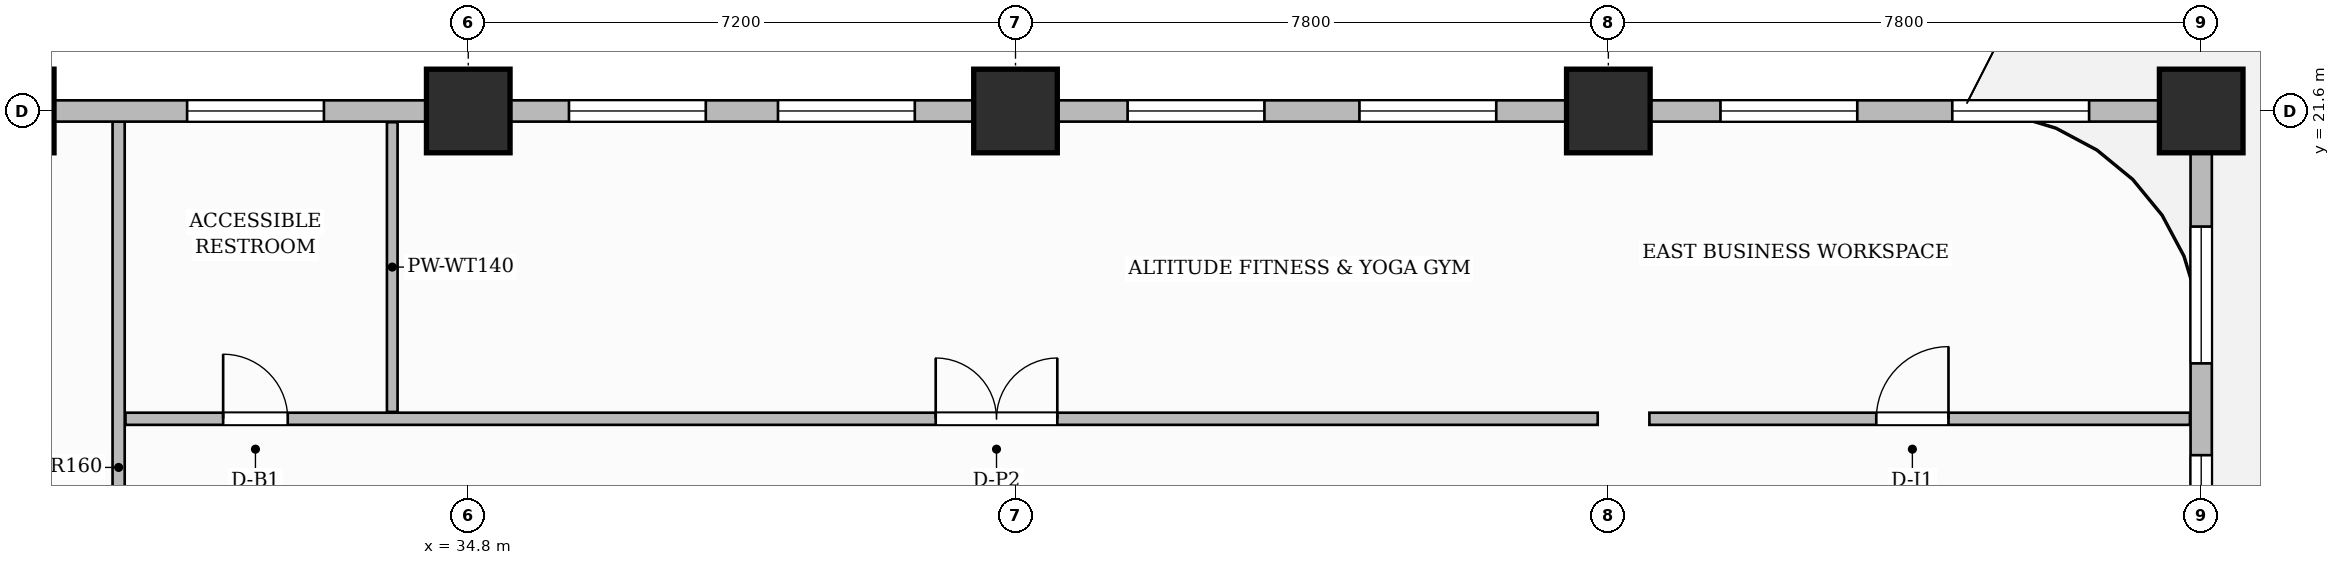
"""IFC4 building model, lengths in metres.
Left out: names, types, materials, properties, quantities, classifications, styles, units other than length and angle.
Written with IfcOpenShell. Run it as: python <this file> out.ifc"""

import sys

from ifc_helpers import new_model, si_unit, direction, frame, frame_2d, origin, origin_2d, place, context, subcontext, project, spatial, rectangle, extrude, source, transform, mapped, element, fill, save


model = new_model("IFC4")
c1 = context("Model", 3, precision=1e-05, world=origin(), true_north=direction((0.0, 1.0)))
c2 = subcontext(c1, "Body", "Model", "MODEL_VIEW")
j1 = project(units=[si_unit("LENGTHUNIT", "METRE"), si_unit("PLANEANGLEUNIT", "RADIAN")], contexts=[c1])
p1 = place(None, origin())
s1 = spatial("IfcSite", under=j1, at=p1, CompositionType="ELEMENT")
p2 = place(p1, origin())
s2 = spatial("IfcBuilding", under=s1, at=p2, CompositionType="ELEMENT")
p3 = place(p2, frame((0.0, 0.0, 50.9)))
s3 = spatial("IfcBuildingStorey", under=s2, at=p3, CompositionType="ELEMENT", Elevation=50.9)
m1 = source(origin(), c2, "Body", "SweptSolid", [
    extrude(rectangle(XDim=1.1, YDim=1.1, at=origin_2d()), origin(), (0.0, 0.0, 1.0), 3.7),
])
for number, where, z_axis, x_axis in (
    (1, (28.8, 21.6, 0.0), (0.0, 0.0, 1.0), (1.0, 0.0, 0.0)),
    (2, (34.8, 21.6, 0.0), (0.0, 0.0, 1.0), (1.0, 0.0, 0.0)),
    (3, (42.0, 21.6, 0.0), (0.0, 0.0, 1.0), (1.0, 0.0, 0.0)),
    (4, (49.8, 21.6, 0.0), (0.0, 0.0, 1.0), (1.0, 0.0, 0.0)),
    (5, (57.6, 21.6, 0.0), (0.0, 0.0, 1.0), (1.0, 0.0, 0.0)),
):
    element("IfcColumn", number, at=place(p3, frame(where, z_axis=z_axis, x_axis=x_axis)), inside=s3, PredefinedType="COLUMN", context=c2, shape_type="MappedRepresentation", body=[
        mapped(m1, transform((0.0, 0.0, 0.0), scale=1.0)),
    ])
p4 = place(p3, frame((30.2, 12.36, 0.0), z_axis=(0.0, 0.0, 1.0), x_axis=(0.0, 1.0, 0.0)))
e6 = element("IfcWall", 6, at=p4, inside=s3, PredefinedType="PARTITIONING", context=c2, shape_type="SweptSolid", body=[
    extrude(rectangle(XDim=9.1, YDim=0.16, at=frame_2d((4.55, 0.0))), origin(), (0.0, 0.0, 1.0), 3.45),
])
p5 = place(p3, frame((30.29, 17.55, 0.0), z_axis=(0.0, 0.0, 1.0), x_axis=(1.0, 0.0, 0.0)))
e7 = element("IfcWall", 7, at=p5, inside=s3, PredefinedType="PARTITIONING", context=c2, shape_type="SweptSolid", body=[
    extrude(rectangle(XDim=19.37, YDim=0.16, at=frame_2d((9.685, 0.0))), origin(), (0.0, 0.0, 1.0), 3.45),
])
p6 = place(p5, frame((1.285, 0.0, 0.0)))
e8 = element("IfcOpeningElement", 8, at=p6, cuts=e7, PredefinedType="OPENING", context=c2, shape_type="SweptSolid", body=[
    extrude(rectangle(XDim=0.85, YDim=2.1, at=frame_2d((0.425, 1.05))), frame((0.0, 0.09, 0.0), z_axis=(0.0, -1.0, 0.0), x_axis=(1.0, 0.0, 0.0)), (0.0, 0.0, 1.0), 0.18),
])
p7 = place(p5, frame((10.66, 0.0, 0.0)))
e9 = element("IfcOpeningElement", 9, at=p7, cuts=e7, PredefinedType="OPENING", context=c2, shape_type="SweptSolid", body=[
    extrude(rectangle(XDim=1.6, YDim=2.4, at=frame_2d((0.8, 1.2))), frame((0.0, 0.09, 0.0), z_axis=(0.0, -1.0, 0.0), x_axis=(1.0, 0.0, 0.0)), (0.0, 0.0, 1.0), 0.18),
])
p8 = place(p3, frame((50.34, 17.55, 0.0), z_axis=(0.0, 0.0, 1.0), x_axis=(1.0, 0.0, 0.0)))
e10 = element("IfcWall", 10, at=p8, inside=s3, PredefinedType="PARTITIONING", context=c2, shape_type="SweptSolid", body=[
    extrude(rectangle(XDim=7.112, YDim=0.16, at=frame_2d((3.556, 0.0))), origin(), (0.0, 0.0, 1.0), 3.45),
])
p9 = place(p8, frame((2.985, 0.0, 0.0)))
e11 = element("IfcOpeningElement", 11, at=p9, cuts=e10, PredefinedType="OPENING", context=c2, shape_type="SweptSolid", body=[
    extrude(rectangle(XDim=0.95, YDim=2.15, at=frame_2d((0.475, 1.075))), frame((0.0, 0.09, 0.0), z_axis=(0.0, -1.0, 0.0), x_axis=(1.0, 0.0, 0.0)), (0.0, 0.0, 1.0), 0.18),
])
p10 = place(p3, frame((33.8, 17.64, 0.0), z_axis=(0.0, 0.0, 1.0), x_axis=(0.0, 1.0, 0.0)))
e12 = element("IfcWall", 12, at=p10, inside=s3, PredefinedType="PARTITIONING", context=c2, shape_type="SweptSolid", body=[
    extrude(rectangle(XDim=3.812, YDim=0.14, at=frame_2d((1.906, 0.0))), origin(), (0.0, 0.0, 1.0), 3.45),
])
p11 = place(p3, frame((57.6, 0.05, 0.0), z_axis=(0.0, 0.0, 1.0), x_axis=(0.0, 1.0, 0.0)))
e13 = element("IfcWall", 13, at=p11, inside=s3, PredefinedType="SOLIDWALL", context=c2, shape_type="SweptSolid", body=[
    extrude(rectangle(XDim=21.5, YDim=0.28, at=frame_2d((10.75, 0.0))), origin(), (0.0, 0.0, 1.0), 2.885),
])
p12 = place(p11, frame((2.75, 0.0, 0.0)))
e14 = element("IfcOpeningElement", 14, at=p12, cuts=e13, PredefinedType="OPENING", context=c2, shape_type="SweptSolid", body=[
    extrude(rectangle(XDim=1.2, YDim=2.2, at=frame_2d((0.6, 1.1))), frame((0.0, 0.15, 0.0), z_axis=(0.0, -1.0, 0.0), x_axis=(1.0, 0.0, 0.0)), (0.0, 0.0, 1.0), 0.3),
])
p13 = place(p11, frame((1.025, 0.0, 0.8)))
e15 = element("IfcOpeningElement", 15, at=p13, cuts=e13, PredefinedType="OPENING", context=c2, shape_type="SweptSolid", body=[
    extrude(rectangle(XDim=1.15, YDim=1.8, at=frame_2d((0.575, 0.9))), frame((0.0, 0.15, 0.0), z_axis=(0.0, -1.0, 0.0), x_axis=(1.0, 0.0, 0.0)), (0.0, 0.0, 1.0), 0.3),
])
p14 = place(p11, frame((4.654, 0.0, 0.8)))
e16 = element("IfcOpeningElement", 16, at=p14, cuts=e13, PredefinedType="OPENING", context=c2, shape_type="SweptSolid", body=[
    extrude(rectangle(XDim=1.4, YDim=1.85, at=frame_2d((0.7, 0.925))), frame((0.0, 0.15, 0.0), z_axis=(0.0, -1.0, 0.0), x_axis=(1.0, 0.0, 0.0)), (0.0, 0.0, 1.0), 0.3),
])
p15 = place(p11, frame((10.454, 0.0, 0.8)))
e17 = element("IfcOpeningElement", 17, at=p15, cuts=e13, PredefinedType="OPENING", context=c2, shape_type="SweptSolid", body=[
    extrude(rectangle(XDim=1.8, YDim=1.85, at=frame_2d((0.9, 0.925))), frame((0.0, 0.15, 0.0), z_axis=(0.0, -1.0, 0.0), x_axis=(1.0, 0.0, 0.0)), (0.0, 0.0, 1.0), 0.3),
])
p16 = place(p11, frame((15.621, 0.0, 0.8)))
e18 = element("IfcOpeningElement", 18, at=p16, cuts=e13, PredefinedType="OPENING", context=c2, shape_type="SweptSolid", body=[
    extrude(rectangle(XDim=1.4, YDim=1.85, at=frame_2d((0.7, 0.925))), frame((0.0, 0.15, 0.0), z_axis=(0.0, -1.0, 0.0), x_axis=(1.0, 0.0, 0.0)), (0.0, 0.0, 1.0), 0.3),
])
p17 = place(p11, frame((18.229, 0.0, 0.8)))
e19 = element("IfcOpeningElement", 19, at=p17, cuts=e13, PredefinedType="OPENING", context=c2, shape_type="SweptSolid", body=[
    extrude(rectangle(XDim=1.8, YDim=1.85, at=frame_2d((0.9, 0.925))), frame((0.0, 0.15, 0.0), z_axis=(0.0, -1.0, 0.0), x_axis=(1.0, 0.0, 0.0)), (0.0, 0.0, 1.0), 0.3),
])
p18 = place(p3, frame((14.4, 21.6, 0.0), z_axis=(0.0, 0.0, 1.0), x_axis=(1.0, 0.0, 0.0)))
e20 = element("IfcWall", 20, at=p18, inside=s3, PredefinedType="SOLIDWALL", context=c2, shape_type="SweptSolid", body=[
    extrude(rectangle(XDim=43.2, YDim=0.28, at=frame_2d((21.6, 0.0))), origin(), (0.0, 0.0, 1.0), 2.885),
])
p19 = place(p18, frame((1.5, 0.0, 0.0)))
e21 = element("IfcOpeningElement", 21, at=p19, cuts=e20, PredefinedType="OPENING", context=c2, shape_type="SweptSolid", body=[
    extrude(rectangle(XDim=1.2, YDim=2.2, at=frame_2d((0.6, 1.1))), frame((0.0, 0.15, 0.0), z_axis=(0.0, -1.0, 0.0), x_axis=(1.0, 0.0, 0.0)), (0.0, 0.0, 1.0), 0.3),
])
p20 = place(p18, frame((3.321, 0.0, 0.8)))
e22 = element("IfcOpeningElement", 22, at=p20, cuts=e20, PredefinedType="OPENING", context=c2, shape_type="SweptSolid", body=[
    extrude(rectangle(XDim=1.15, YDim=1.8, at=frame_2d((0.575, 0.9))), frame((0.0, 0.15, 0.0), z_axis=(0.0, -1.0, 0.0), x_axis=(1.0, 0.0, 0.0)), (0.0, 0.0, 1.0), 0.3),
])
p21 = place(p18, frame((5.129, 0.0, 0.8)))
e23 = element("IfcOpeningElement", 23, at=p21, cuts=e20, PredefinedType="OPENING", context=c2, shape_type="SweptSolid", body=[
    extrude(rectangle(XDim=0.95, YDim=1.75, at=frame_2d((0.475, 0.875))), frame((0.0, 0.15, 0.0), z_axis=(0.0, -1.0, 0.0), x_axis=(1.0, 0.0, 0.0)), (0.0, 0.0, 1.0), 0.3),
])
p22 = place(p18, frame((8.496, 0.0, 0.8)))
e24 = element("IfcOpeningElement", 24, at=p22, cuts=e20, PredefinedType="OPENING", context=c2, shape_type="SweptSolid", body=[
    extrude(rectangle(XDim=1.4, YDim=1.85, at=frame_2d((0.7, 0.925))), frame((0.0, 0.15, 0.0), z_axis=(0.0, -1.0, 0.0), x_axis=(1.0, 0.0, 0.0)), (0.0, 0.0, 1.0), 0.3),
])
p23 = place(p18, frame((11.104, 0.0, 0.8)))
e25 = element("IfcOpeningElement", 25, at=p23, cuts=e20, PredefinedType="OPENING", context=c2, shape_type="SweptSolid", body=[
    extrude(rectangle(XDim=1.8, YDim=1.85, at=frame_2d((0.9, 0.925))), frame((0.0, 0.15, 0.0), z_axis=(0.0, -1.0, 0.0), x_axis=(1.0, 0.0, 0.0)), (0.0, 0.0, 1.0), 0.3),
])
p24 = place(p18, frame((16.701, 0.0, 0.8)))
e26 = element("IfcOpeningElement", 26, at=p24, cuts=e20, PredefinedType="OPENING", context=c2, shape_type="SweptSolid", body=[
    extrude(rectangle(XDim=1.8, YDim=1.85, at=frame_2d((0.9, 0.925))), frame((0.0, 0.15, 0.0), z_axis=(0.0, -1.0, 0.0), x_axis=(1.0, 0.0, 0.0)), (0.0, 0.0, 1.0), 0.3),
])
p25 = place(p18, frame((21.725, 0.0, 0.8)))
e27 = element("IfcOpeningElement", 27, at=p25, cuts=e20, PredefinedType="OPENING", context=c2, shape_type="SweptSolid", body=[
    extrude(rectangle(XDim=1.8, YDim=1.85, at=frame_2d((0.9, 0.925))), frame((0.0, 0.15, 0.0), z_axis=(0.0, -1.0, 0.0), x_axis=(1.0, 0.0, 0.0)), (0.0, 0.0, 1.0), 0.3),
])
p26 = place(p18, frame((24.475, 0.0, 0.8)))
e28 = element("IfcOpeningElement", 28, at=p26, cuts=e20, PredefinedType="OPENING", context=c2, shape_type="SweptSolid", body=[
    extrude(rectangle(XDim=1.8, YDim=1.85, at=frame_2d((0.9, 0.925))), frame((0.0, 0.15, 0.0), z_axis=(0.0, -1.0, 0.0), x_axis=(1.0, 0.0, 0.0)), (0.0, 0.0, 1.0), 0.3),
])
p27 = place(p18, frame((29.075, 0.0, 0.8)))
e29 = element("IfcOpeningElement", 29, at=p27, cuts=e20, PredefinedType="OPENING", context=c2, shape_type="SweptSolid", body=[
    extrude(rectangle(XDim=1.8, YDim=1.85, at=frame_2d((0.9, 0.925))), frame((0.0, 0.15, 0.0), z_axis=(0.0, -1.0, 0.0), x_axis=(1.0, 0.0, 0.0)), (0.0, 0.0, 1.0), 0.3),
])
p28 = place(p18, frame((32.125, 0.0, 0.8)))
e30 = element("IfcOpeningElement", 30, at=p28, cuts=e20, PredefinedType="OPENING", context=c2, shape_type="SweptSolid", body=[
    extrude(rectangle(XDim=1.8, YDim=1.85, at=frame_2d((0.9, 0.925))), frame((0.0, 0.15, 0.0), z_axis=(0.0, -1.0, 0.0), x_axis=(1.0, 0.0, 0.0)), (0.0, 0.0, 1.0), 0.3),
])
p29 = place(p18, frame((36.875, 0.0, 0.8)))
e31 = element("IfcOpeningElement", 31, at=p29, cuts=e20, PredefinedType="OPENING", context=c2, shape_type="SweptSolid", body=[
    extrude(rectangle(XDim=1.8, YDim=1.85, at=frame_2d((0.9, 0.925))), frame((0.0, 0.15, 0.0), z_axis=(0.0, -1.0, 0.0), x_axis=(1.0, 0.0, 0.0)), (0.0, 0.0, 1.0), 0.3),
])
p30 = place(p18, frame((39.925, 0.0, 0.8)))
e32 = element("IfcOpeningElement", 32, at=p30, cuts=e20, PredefinedType="OPENING", context=c2, shape_type="SweptSolid", body=[
    extrude(rectangle(XDim=1.8, YDim=1.85, at=frame_2d((0.9, 0.925))), frame((0.0, 0.15, 0.0), z_axis=(0.0, -1.0, 0.0), x_axis=(1.0, 0.0, 0.0)), (0.0, 0.0, 1.0), 0.3),
])
m2 = source(origin(), c2, "Body", "SweptSolid", [
    extrude(rectangle(XDim=0.95, YDim=2.15, at=frame_2d((0.475, 1.075))), frame((0.0, 0.025, 0.0), z_axis=(0.0, -1.0, 0.0), x_axis=(1.0, 0.0, 0.0)), (0.0, 0.0, 1.0), 0.05),
])
p31 = place(p9, origin())
e33 = element("IfcDoor", 33, at=p31, inside=s3, OperationType="SINGLE_SWING_RIGHT", PredefinedType="DOOR", context=c2, shape_type="MappedRepresentation", body=[
    mapped(m2, transform((0.0, 0.0, 0.0), scale=1.0)),
])
fill(e11, e33)
m3 = source(origin(), c2, "Body", "SweptSolid", [
    extrude(rectangle(XDim=0.85, YDim=2.1, at=frame_2d((0.425, 1.05))), frame((0.0, 0.025, 0.0), z_axis=(0.0, -1.0, 0.0), x_axis=(1.0, 0.0, 0.0)), (0.0, 0.0, 1.0), 0.05),
])
p32 = place(p6, origin())
e34 = element("IfcDoor", 34, at=p32, inside=s3, OperationType="SINGLE_SWING_LEFT", PredefinedType="DOOR", context=c2, shape_type="MappedRepresentation", body=[
    mapped(m3, transform((0.0, 0.0, 0.0), scale=1.0)),
])
fill(e8, e34)
m4 = source(origin(), c2, "Body", "SweptSolid", [
    extrude(rectangle(XDim=1.6, YDim=2.4, at=frame_2d((0.8, 1.2))), frame((0.0, 0.025, 0.0), z_axis=(0.0, -1.0, 0.0), x_axis=(1.0, 0.0, 0.0)), (0.0, 0.0, 1.0), 0.05),
])
p33 = place(p7, origin())
e35 = element("IfcDoor", 35, at=p33, inside=s3, OperationType="DOUBLE_DOOR_SINGLE_SWING", PredefinedType="DOOR", context=c2, shape_type="MappedRepresentation", body=[
    mapped(m4, transform((0.0, 0.0, 0.0), scale=1.0)),
])
fill(e9, e35)
m5 = source(origin(), c2, "Body", "SweptSolid", [
    extrude(rectangle(XDim=1.4, YDim=1.85, at=frame_2d((0.7, 0.925))), frame((0.0, 0.03, 0.0), z_axis=(0.0, -1.0, 0.0), x_axis=(1.0, 0.0, 0.0)), (0.0, 0.0, 1.0), 0.06),
])
p34 = place(p16, origin())
e36 = element("IfcWindow", 36, at=p34, inside=s3, PartitioningType="SINGLE_PANEL", PredefinedType="WINDOW", context=c2, shape_type="MappedRepresentation", body=[
    mapped(m5, transform((0.0, 0.0, 0.0), scale=1.0)),
])
fill(e18, e36)
m6 = source(origin(), c2, "Body", "SweptSolid", [
    extrude(rectangle(XDim=1.8, YDim=1.85, at=frame_2d((0.9, 0.925))), frame((0.0, 0.03, 0.0), z_axis=(0.0, -1.0, 0.0), x_axis=(1.0, 0.0, 0.0)), (0.0, 0.0, 1.0), 0.06),
])
p35 = place(p17, origin())
e37 = element("IfcWindow", 37, at=p35, inside=s3, PartitioningType="DOUBLE_PANEL_VERTICAL", PredefinedType="WINDOW", context=c2, shape_type="MappedRepresentation", body=[
    mapped(m6, transform((0.0, 0.0, 0.0), scale=1.0)),
])
fill(e19, e37)
p36 = place(p24, origin())
e38 = element("IfcWindow", 38, at=p36, inside=s3, PartitioningType="DOUBLE_PANEL_VERTICAL", PredefinedType="WINDOW", context=c2, shape_type="MappedRepresentation", body=[
    mapped(m6, transform((0.0, 0.0, 0.0), scale=1.0)),
])
fill(e26, e38)
p37 = place(p25, origin())
e39 = element("IfcWindow", 39, at=p37, inside=s3, PartitioningType="DOUBLE_PANEL_VERTICAL", PredefinedType="WINDOW", context=c2, shape_type="MappedRepresentation", body=[
    mapped(m6, transform((0.0, 0.0, 0.0), scale=1.0)),
])
fill(e27, e39)
p38 = place(p26, origin())
e40 = element("IfcWindow", 40, at=p38, inside=s3, PartitioningType="DOUBLE_PANEL_VERTICAL", PredefinedType="WINDOW", context=c2, shape_type="MappedRepresentation", body=[
    mapped(m6, transform((0.0, 0.0, 0.0), scale=1.0)),
])
fill(e28, e40)
p39 = place(p27, origin())
e41 = element("IfcWindow", 41, at=p39, inside=s3, PartitioningType="DOUBLE_PANEL_VERTICAL", PredefinedType="WINDOW", context=c2, shape_type="MappedRepresentation", body=[
    mapped(m6, transform((0.0, 0.0, 0.0), scale=1.0)),
])
fill(e29, e41)
p40 = place(p28, origin())
e42 = element("IfcWindow", 42, at=p40, inside=s3, PartitioningType="DOUBLE_PANEL_VERTICAL", PredefinedType="WINDOW", context=c2, shape_type="MappedRepresentation", body=[
    mapped(m6, transform((0.0, 0.0, 0.0), scale=1.0)),
])
fill(e30, e42)
p41 = place(p29, origin())
e43 = element("IfcWindow", 43, at=p41, inside=s3, PartitioningType="DOUBLE_PANEL_VERTICAL", PredefinedType="WINDOW", context=c2, shape_type="MappedRepresentation", body=[
    mapped(m6, transform((0.0, 0.0, 0.0), scale=1.0)),
])
fill(e31, e43)
p42 = place(p30, origin())
e44 = element("IfcWindow", 44, at=p42, inside=s3, PartitioningType="DOUBLE_PANEL_VERTICAL", PredefinedType="WINDOW", context=c2, shape_type="MappedRepresentation", body=[
    mapped(m6, transform((0.0, 0.0, 0.0), scale=1.0)),
])
fill(e32, e44)
save(model, sys.argv[1])
